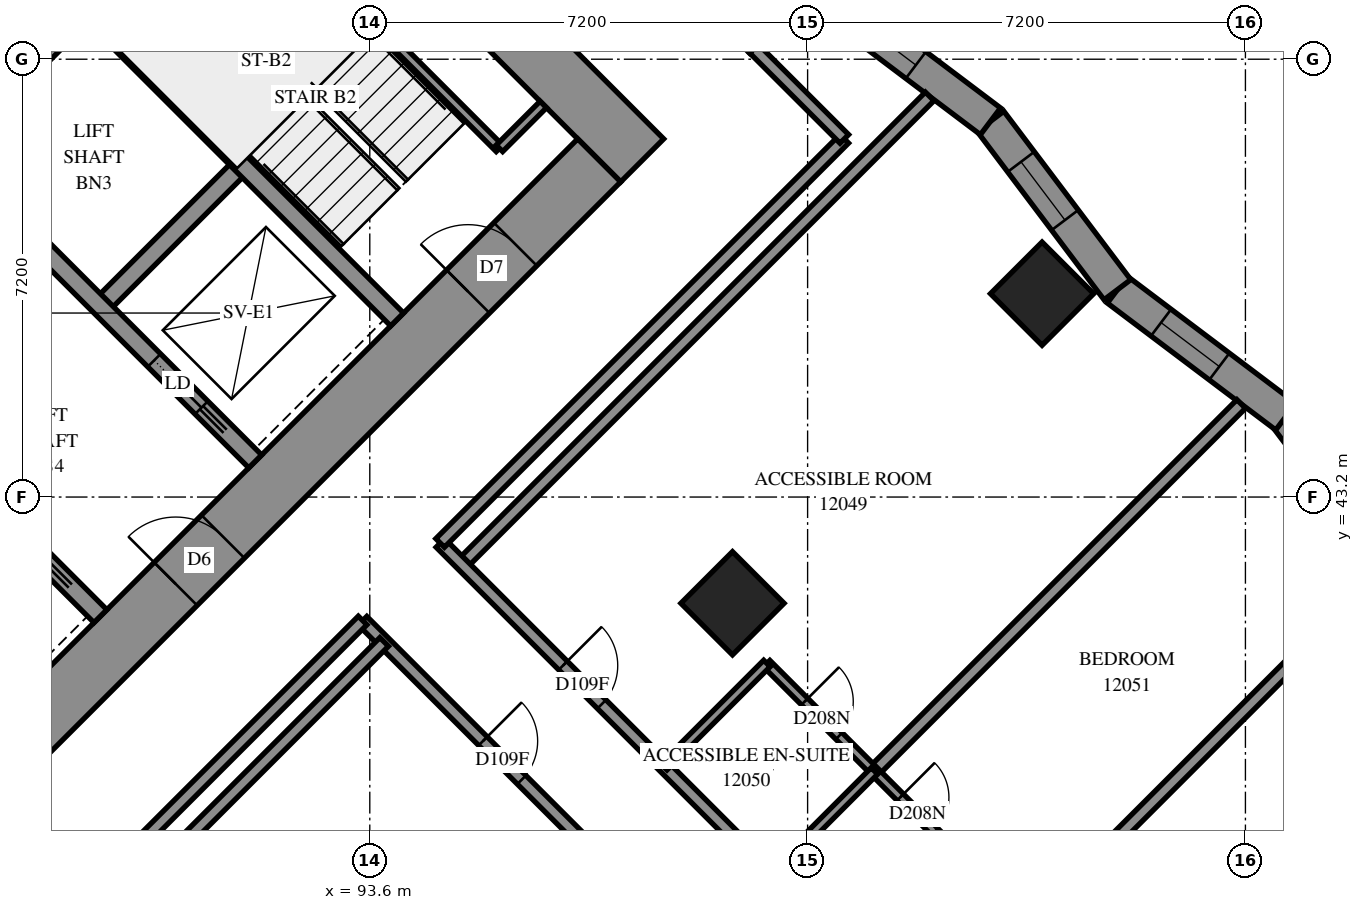
"""IFC4 building model, lengths in metres.
Left out: names, types, materials, properties, quantities, classifications, styles, units other than length and angle.
Written with IfcOpenShell. Run it as: python <this file> out.ifc"""

import sys

from ifc_helpers import new_model, si_unit, direction, frame, frame_2d, origin, origin_2d, place, context, subcontext, project, spatial, polyline, rectangle, outline, extrude, element, fill, save


model = new_model("IFC4")
c1 = context("Model", 3, precision=1e-05, world=origin(), true_north=direction((0.0, 1.0)))
c2 = subcontext(c1, "Body", "Model", "MODEL_VIEW")
j1 = project(units=[si_unit("LENGTHUNIT", "METRE"), si_unit("PLANEANGLEUNIT", "RADIAN")], contexts=[c1])
p1 = place(None, origin())
s1 = spatial("IfcSite", under=j1, at=p1, CompositionType="ELEMENT")
p2 = place(p1, origin())
s2 = spatial("IfcBuilding", under=s1, at=p2, CompositionType="ELEMENT")
p3 = place(p2, frame((0.0, 0.0, 47.4)))
s3 = spatial("IfcBuildingStorey", under=s2, at=p3, CompositionType="ELEMENT", Elevation=47.4)
for number, where, z_axis, x_axis in (
    (1, (104.656, 46.544, 0.0), (0.0, 0.0, 1.0), (0.707, -0.707, 0.0)),
    (2, (99.565, 41.453, 0.0), (0.0, 0.0, 1.0), (0.707, -0.707, 0.0)),
):
    element("IfcColumn", number, at=place(p3, frame(where, z_axis=z_axis, x_axis=x_axis)), inside=s3, PredefinedType="COLUMN", context=c2, shape_type="SweptSolid", body=[
        extrude(rectangle(XDim=1.2, YDim=1.2, at=origin_2d()), origin(), (0.0, 0.0, 1.0), 3.1),
    ])
p4 = place(p3, frame((86.483, 60.333, -0.3), z_axis=(0.0, 0.0, 1.0), x_axis=(0.70710983, -0.7071037324, 0.0)))
e3 = element("IfcWall", 3, at=p4, inside=s3, PredefinedType="SHEAR", context=c2, shape_type="SweptSolid", body=[
    extrude(rectangle(XDim=16.4, YDim=1.0, at=frame_2d((8.2, 0.0))), origin(), (0.0, 0.0, 1.0), 2.7),
])
p5 = place(p4, frame((11.0, 0.0, 0.3)))
e4 = element("IfcOpeningElement", 4, at=p5, cuts=e3, PredefinedType="OPENING", context=c2, shape_type="SweptSolid", body=[
    extrude(rectangle(XDim=0.8, YDim=2.1, at=frame_2d((0.4, 1.05))), frame((0.0, 0.51, 0.0), z_axis=(0.0, -1.0, 0.0), x_axis=(1.0, 0.0, 0.0)), (0.0, 0.0, 1.0), 1.02),
])
p6 = place(p3, frame((87.19, 38.554, -0.3), z_axis=(0.0, 0.0, 1.0), x_axis=(0.707103309, 0.7071102534, 0.0)))
e5 = element("IfcWall", 5, at=p6, inside=s3, PredefinedType="SHEAR", context=c2, shape_type="SweptSolid", body=[
    extrude(rectangle(XDim=14.4, YDim=1.0, at=frame_2d((7.2, 0.0))), origin(), (0.0, 0.0, 1.0), 2.7),
])
p7 = place(p6, frame((4.55, 0.0, 0.3)))
e6 = element("IfcOpeningElement", 6, at=p7, cuts=e5, PredefinedType="OPENING", context=c2, shape_type="SweptSolid", body=[
    extrude(rectangle(XDim=1.1, YDim=2.1, at=frame_2d((0.55, 1.05))), frame((0.0, 0.51, 0.0), z_axis=(0.0, -1.0, 0.0), x_axis=(1.0, 0.0, 0.0)), (0.0, 0.0, 1.0), 1.02),
])
p8 = place(p6, frame((11.35, 0.0, 0.3)))
e7 = element("IfcOpeningElement", 7, at=p8, cuts=e5, PredefinedType="OPENING", context=c2, shape_type="SweptSolid", body=[
    extrude(rectangle(XDim=1.1, YDim=2.1, at=frame_2d((0.55, 1.05))), frame((0.0, 0.51, 0.0), z_axis=(0.0, -1.0, 0.0), x_axis=(1.0, 0.0, 0.0)), (0.0, 0.0, 1.0), 1.02),
])
for number, where, z_axis, x_axis in (
    (8, (86.625, 48.878, 0.0), (0.0, 0.0, 1.0), (0.707, 0.707, 0.0)),
    (9, (89.17, 46.332, 0.0), (0.0, 0.0, 1.0), (0.707, 0.707, 0.0)),
):
    element("IfcWall", number, at=place(p3, frame(where, z_axis=z_axis, x_axis=x_axis)), inside=s3, PredefinedType="SOLIDWALL", context=c2, shape_type="SweptSolid", body=[
        extrude(rectangle(XDim=3.3, YDim=0.3, at=frame_2d((1.65, 0.0))), origin(), (0.0, 0.0, 1.0), 3.1),
    ])
p9 = place(p3, frame((78.988, 51.423, 0.0), z_axis=(0.0, 0.0, 1.0), x_axis=(0.7071067812, -0.7071067812, 0.0)))
e10 = element("IfcWall", 10, at=p9, inside=s3, PredefinedType="SOLIDWALL", context=c2, shape_type="SweptSolid", body=[
    extrude(rectangle(XDim=14.4, YDim=0.3, at=frame_2d((7.2, 0.0))), origin(), (0.0, 0.0, 1.0), 3.1),
])
p10 = place(p9, frame((1.25, 0.0, 0.0)))
e11 = element("IfcOpeningElement", 11, at=p10, cuts=e10, PredefinedType="OPENING", context=c2, shape_type="SweptSolid", body=[
    extrude(rectangle(XDim=1.1, YDim=2.1, at=frame_2d((0.55, 1.05))), frame((0.0, 0.16, 0.0), z_axis=(0.0, -1.0, 0.0), x_axis=(1.0, 0.0, 0.0)), (0.0, 0.0, 1.0), 0.32),
])
p11 = place(p9, frame((4.85, 0.0, 0.0)))
e12 = element("IfcOpeningElement", 12, at=p11, cuts=e10, PredefinedType="OPENING", context=c2, shape_type="SweptSolid", body=[
    extrude(rectangle(XDim=1.1, YDim=2.1, at=frame_2d((0.55, 1.05))), frame((0.0, 0.16, 0.0), z_axis=(0.0, -1.0, 0.0), x_axis=(1.0, 0.0, 0.0)), (0.0, 0.0, 1.0), 0.32),
])
p12 = place(p9, frame((8.45, 0.0, 0.0)))
e13 = element("IfcOpeningElement", 13, at=p12, cuts=e10, PredefinedType="OPENING", context=c2, shape_type="SweptSolid", body=[
    extrude(rectangle(XDim=1.1, YDim=2.1, at=frame_2d((0.55, 1.05))), frame((0.0, 0.16, 0.0), z_axis=(0.0, -1.0, 0.0), x_axis=(1.0, 0.0, 0.0)), (0.0, 0.0, 1.0), 0.32),
])
p13 = place(p9, frame((12.05, 0.0, 0.0)))
e14 = element("IfcOpeningElement", 14, at=p13, cuts=e10, PredefinedType="OPENING", context=c2, shape_type="SweptSolid", body=[
    extrude(rectangle(XDim=1.1, YDim=2.1, at=frame_2d((0.55, 1.05))), frame((0.0, 0.16, 0.0), z_axis=(0.0, -1.0, 0.0), x_axis=(1.0, 0.0, 0.0)), (0.0, 0.0, 1.0), 0.32),
])
p14 = place(p3, frame((81.534, 53.969, 0.0), z_axis=(0.0, 0.0, 1.0), x_axis=(0.707103309, -0.7071102534, 0.0)))
e15 = element("IfcWall", 15, at=p14, inside=s3, PredefinedType="SOLIDWALL", context=c2, shape_type="SweptSolid", body=[
    extrude(rectangle(XDim=14.4, YDim=0.3, at=frame_2d((7.2, 0.0))), origin(), (0.0, 0.0, 1.0), 3.1),
])
p15 = place(p14, frame((12.05, 0.0, 0.0)))
e16 = element("IfcOpeningElement", 16, at=p15, cuts=e15, PredefinedType="OPENING", context=c2, shape_type="SweptSolid", body=[
    extrude(rectangle(XDim=1.1, YDim=2.1, at=frame_2d((0.55, 1.05))), frame((0.0, 0.16, 0.0), z_axis=(0.0, -1.0, 0.0), x_axis=(1.0, 0.0, 0.0)), (0.0, 0.0, 1.0), 0.32),
])
p16 = place(p3, frame((88.958, 51.211, 0.0), z_axis=(0.0, 0.0, 1.0), x_axis=(0.7070998367, -0.7071137256, 0.0)))
e17 = element("IfcWall", 17, at=p16, inside=s3, PredefinedType="SOLIDWALL", context=c2, shape_type="SweptSolid", body=[
    extrude(rectangle(XDim=7.2, YDim=0.3, at=frame_2d((3.6, 0.0))), origin(), (0.0, 0.0, 1.0), 3.1),
])
p17 = place(p3, frame((110.751, 41.753, 0.0), z_axis=(0.0, 0.0, 1.0), x_axis=(-0.6019683111, 0.7985199762, 0.0)))
e18 = element("IfcWall", 18, at=p17, inside=s3, PredefinedType="SOLIDWALL", context=c2, shape_type="SweptSolid", body=[
    extrude(outline(polyline([(0.039, -0.275), (3.506, -0.275), (3.429, 0.275), (-0.039, 0.275), (0.039, -0.275)])), origin(), (0.0, 0.0, 1.0), 3.1),
])
p18 = place(p17, frame((1.266, 0.0, 0.5)))
e19 = element("IfcOpeningElement", 19, at=p18, cuts=e18, PredefinedType="OPENING", context=c2, shape_type="SweptSolid", body=[
    extrude(rectangle(XDim=1.2, YDim=2.45, at=frame_2d((0.6, 1.225))), frame((0.0, 0.285, 0.0), z_axis=(0.0, -1.0, 0.0), x_axis=(1.0, 0.0, 0.0)), (0.0, 0.0, 1.0), 0.57),
])
p19 = place(p3, frame((108.664, 44.522, 0.0), z_axis=(0.0, 0.0, 1.0), x_axis=(-0.7985338376, 0.6019499233, 0.0)))
e20 = element("IfcWall", 20, at=p19, inside=s3, PredefinedType="SOLIDWALL", context=c2, shape_type="SweptSolid", body=[
    extrude(outline(polyline([(-0.039, -0.275), (3.429, -0.275), (3.506, 0.275), (0.039, 0.275), (-0.039, -0.275)])), origin(), (0.0, 0.0, 1.0), 3.1),
])
p20 = place(p19, frame((1.369, 0.0, 0.5)))
e21 = element("IfcOpeningElement", 21, at=p20, cuts=e20, PredefinedType="OPENING", context=c2, shape_type="SweptSolid", body=[
    extrude(rectangle(XDim=1.2, YDim=2.45, at=frame_2d((0.6, 1.225))), frame((0.0, 0.285, 0.0), z_axis=(0.0, -1.0, 0.0), x_axis=(1.0, 0.0, 0.0)), (0.0, 0.0, 1.0), 0.57),
])
p21 = place(p3, frame((105.895, 46.61, 0.0), z_axis=(0.0, 0.0, 1.0), x_axis=(-0.6019499233, 0.7985338376, 0.0)))
e22 = element("IfcWall", 22, at=p21, inside=s3, PredefinedType="SOLIDWALL", context=c2, shape_type="SweptSolid", body=[
    extrude(outline(polyline([(0.039, -0.275), (3.506, -0.275), (3.429, 0.275), (-0.039, 0.275), (0.039, -0.275)])), origin(), (0.0, 0.0, 1.0), 3.1),
])
p22 = place(p21, frame((1.433, 0.0, 0.5)))
e23 = element("IfcOpeningElement", 23, at=p22, cuts=e22, PredefinedType="OPENING", context=c2, shape_type="SweptSolid", body=[
    extrude(rectangle(XDim=1.2, YDim=2.45, at=frame_2d((0.6, 1.225))), frame((0.0, 0.285, 0.0), z_axis=(0.0, -1.0, 0.0), x_axis=(1.0, 0.0, 0.0)), (0.0, 0.0, 1.0), 0.57),
])
p23 = place(p3, frame((103.807, 49.379, 0.0), z_axis=(0.0, 0.0, 1.0), x_axis=(-0.7985338376, 0.6019499233, 0.0)))
e24 = element("IfcWall", 24, at=p23, inside=s3, PredefinedType="SOLIDWALL", context=c2, shape_type="SweptSolid", body=[
    extrude(outline(polyline([(-0.039, -0.275), (3.429, -0.275), (3.506, 0.275), (0.039, 0.275), (-0.039, -0.275)])), origin(), (0.0, 0.0, 1.0), 3.1),
])
p24 = place(p23, frame((1.536, 0.0, 0.5)))
e25 = element("IfcOpeningElement", 25, at=p24, cuts=e24, PredefinedType="OPENING", context=c2, shape_type="SweptSolid", body=[
    extrude(rectangle(XDim=1.2, YDim=2.45, at=frame_2d((0.6, 1.225))), frame((0.0, 0.285, 0.0), z_axis=(0.0, -1.0, 0.0), x_axis=(1.0, 0.0, 0.0)), (0.0, 0.0, 1.0), 0.57),
])
p25 = place(p3, frame((91.313, 53.354, 0.0), z_axis=(0.0, 0.0, 1.0), x_axis=(0.7071147811, -0.7070987812, 0.0)))
e26 = element("IfcWall", 26, at=p25, inside=s3, PredefinedType="PARTITIONING", context=c2, shape_type="SweptSolid", body=[
    extrude(rectangle(XDim=6.25, YDim=0.15, at=frame_2d((3.125, 0.0))), origin(), (0.0, 0.0, 1.0), 3.1),
])
p26 = place(p3, frame((95.732, 48.934, 0.0), z_axis=(0.0, 0.0, 1.0), x_axis=(0.7071067812, 0.7071067812, 0.0)))
e27 = element("IfcWall", 27, at=p26, inside=s3, PredefinedType="PARTITIONING", context=c2, shape_type="SweptSolid", body=[
    extrude(rectangle(XDim=1.02, YDim=0.15, at=frame_2d((0.51, 0.0))), origin(), (0.0, 0.0, 1.0), 3.1),
])
p27 = place(p3, frame((93.481, 41.167, 0.0), z_axis=(0.0, 0.0, 1.0), x_axis=(0.7071067812, -0.7071067812, 0.0)))
e28 = element("IfcWall", 28, at=p27, inside=s3, PredefinedType="PARTITIONING", context=c2, shape_type="SweptSolid", body=[
    extrude(rectangle(XDim=25.699, YDim=0.2, at=frame_2d((12.85, 0.0))), origin(), (0.0, 0.0, 1.0), 3.1),
])
p28 = place(p27, frame((2.8, 0.0, 0.0)))
e29 = element("IfcOpeningElement", 29, at=p28, cuts=e28, PredefinedType="OPENING", context=c2, shape_type="SweptSolid", body=[
    extrude(rectangle(XDim=0.9, YDim=2.1, at=frame_2d((0.45, 1.05))), frame((0.0, 0.11, 0.0), z_axis=(0.0, -1.0, 0.0), x_axis=(1.0, 0.0, 0.0)), (0.0, 0.0, 1.0), 0.22),
])
p29 = place(p27, frame((9.948, 0.0, 0.0)))
e30 = element("IfcOpeningElement", 30, at=p29, cuts=e28, PredefinedType="OPENING", context=c2, shape_type="SweptSolid", body=[
    extrude(rectangle(XDim=0.9, YDim=2.1, at=frame_2d((0.45, 1.05))), frame((0.0, 0.11, 0.0), z_axis=(0.0, -1.0, 0.0), x_axis=(1.0, 0.0, 0.0)), (0.0, 0.0, 1.0), 0.22),
])
p30 = place(p27, frame((11.7, 0.0, 0.0)))
e31 = element("IfcOpeningElement", 31, at=p30, cuts=e28, PredefinedType="OPENING", context=c2, shape_type="SweptSolid", body=[
    extrude(rectangle(XDim=0.9, YDim=2.1, at=frame_2d((0.45, 1.05))), frame((0.0, 0.11, 0.0), z_axis=(0.0, -1.0, 0.0), x_axis=(1.0, 0.0, 0.0)), (0.0, 0.0, 1.0), 0.22),
])
p31 = place(p27, frame((17.25, 0.0, 0.0)))
e32 = element("IfcOpeningElement", 32, at=p31, cuts=e28, PredefinedType="OPENING", context=c2, shape_type="SweptSolid", body=[
    extrude(rectangle(XDim=0.9, YDim=2.1, at=frame_2d((0.45, 1.05))), frame((0.0, 0.11, 0.0), z_axis=(0.0, -1.0, 0.0), x_axis=(1.0, 0.0, 0.0)), (0.0, 0.0, 1.0), 0.22),
])
p32 = place(p27, frame((22.82, 0.0, 0.0)))
e33 = element("IfcOpeningElement", 33, at=p32, cuts=e28, PredefinedType="OPENING", context=c2, shape_type="SweptSolid", body=[
    extrude(rectangle(XDim=0.9, YDim=2.1, at=frame_2d((0.45, 1.05))), frame((0.0, 0.11, 0.0), z_axis=(0.0, -1.0, 0.0), x_axis=(1.0, 0.0, 0.0)), (0.0, 0.0, 1.0), 0.22),
])
p33 = place(p3, frame((105.292, 31.908, 0.0), z_axis=(0.0, 0.0, 1.0), x_axis=(0.7071067812, 0.7071067812, 0.0)))
e34 = element("IfcWall", 34, at=p33, inside=s3, PredefinedType="PARTITIONING", context=c2, shape_type="SweptSolid", body=[
    extrude(rectangle(XDim=10.979, YDim=0.2, at=frame_2d((5.49, 0.0))), origin(), (0.0, 0.0, 1.0), 3.1),
])
p34 = place(p3, frame((95.109, 42.091, 0.0), z_axis=(0.0, 0.0, 1.0), x_axis=(0.7071113741, 0.7071021882, 0.0)))
e35 = element("IfcWall", 35, at=p34, inside=s3, PredefinedType="PARTITIONING", context=c2, shape_type="SweptSolid", body=[
    extrude(rectangle(XDim=10.886, YDim=0.2, at=frame_2d((5.443, 0.0))), origin(), (0.0, 0.0, 1.0), 3.1),
])
p35 = place(p3, frame((86.317, 33.298, 0.0), z_axis=(0.0, 0.0, 1.0), x_axis=(0.7071020793, 0.7071114831, 0.0)))
e36 = element("IfcWall", 36, at=p35, inside=s3, PredefinedType="PARTITIONING", context=c2, shape_type="SweptSolid", body=[
    extrude(rectangle(XDim=10.634, YDim=0.2, at=frame_2d((5.317, 0.0))), origin(), (0.0, 0.0, 1.0), 3.1),
])
p36 = place(p3, frame((94.761, 42.446, 0.0), z_axis=(0.0, 0.0, 1.0), x_axis=(0.7071067812, -0.7071067812, 0.0)))
e37 = element("IfcWall", 37, at=p36, inside=s3, PredefinedType="PARTITIONING", context=c2, shape_type="SweptSolid", body=[
    extrude(rectangle(XDim=9.597, YDim=0.2, at=frame_2d((4.798, 0.0))), origin(), (0.0, 0.0, 1.0), 3.1),
])
p37 = place(p36, frame((2.851, 0.0, 0.0)))
e38 = element("IfcOpeningElement", 38, at=p37, cuts=e37, PredefinedType="OPENING", context=c2, shape_type="SweptSolid", body=[
    extrude(rectangle(XDim=0.9, YDim=2.1, at=frame_2d((0.45, 1.05))), frame((0.0, 0.11, 0.0), z_axis=(0.0, -1.0, 0.0), x_axis=(1.0, 0.0, 0.0)), (0.0, 0.0, 1.0), 0.22),
])
for number, where, z_axis, x_axis in (
    (39, (86.836, 34.524, 0.0), (0.0, 0.0, 1.0), (0.707, 0.707, 0.0)),
    (40, (94.757, 42.445, 0.0), (0.0, 0.0, 1.0), (0.707, 0.707, 0.0)),
):
    element("IfcWall", number, at=place(p3, frame(where, z_axis=z_axis, x_axis=x_axis)), inside=s3, PredefinedType="PARTITIONING", context=c2, shape_type="SweptSolid", body=[
        extrude(rectangle(XDim=9.399, YDim=0.2, at=frame_2d((4.699, 0.0))), origin(), (0.0, 0.0, 1.0), 3.1),
    ])
p38 = place(p3, frame((101.896, 38.698, 0.0), z_axis=(0.0, 0.0, 1.0), x_axis=(0.7072298261, 0.7069837149, 0.0)))
e41 = element("IfcWall", 41, at=p38, inside=s3, PredefinedType="PARTITIONING", context=c2, shape_type="SweptSolid", body=[
    extrude(rectangle(XDim=8.533, YDim=0.2, at=frame_2d((4.266, 0.0))), origin(), (0.0, 0.0, 1.0), 3.1),
])
p39 = place(p3, frame((105.255, 36.963, 0.0), z_axis=(0.0, 0.0, 1.0), x_axis=(0.7071067812, 0.7071067812, 0.0)))
e42 = element("IfcWall", 42, at=p39, inside=s3, PredefinedType="PARTITIONING", context=c2, shape_type="SweptSolid", body=[
    extrude(rectangle(XDim=5.504, YDim=0.2, at=frame_2d((2.752, 0.0))), origin(), (0.0, 0.0, 1.0), 3.1),
])
p40 = place(p3, frame((100.126, 40.461, 0.0), z_axis=(0.0, 0.0, 1.0), x_axis=(0.7071067812, -0.7071067812, 0.0)))
e43 = element("IfcWall", 43, at=p40, inside=s3, PredefinedType="PARTITIONING", context=c2, shape_type="SweptSolid", body=[
    extrude(rectangle(XDim=4.401, YDim=0.15, at=frame_2d((2.2, 0.0))), origin(), (0.0, 0.0, 1.0), 3.1),
])
p41 = place(p40, frame((0.883, 0.0, 0.0)))
e44 = element("IfcOpeningElement", 44, at=p41, cuts=e43, PredefinedType="OPENING", context=c2, shape_type="SweptSolid", body=[
    extrude(rectangle(XDim=0.8, YDim=2.1, at=frame_2d((0.4, 1.05))), frame((0.0, 0.085, 0.0), z_axis=(0.0, -1.0, 0.0), x_axis=(1.0, 0.0, 0.0)), (0.0, 0.0, 1.0), 0.17),
])
p42 = place(p40, frame((3.108, 0.0, 0.0)))
e45 = element("IfcOpeningElement", 45, at=p42, cuts=e43, PredefinedType="OPENING", context=c2, shape_type="SweptSolid", body=[
    extrude(rectangle(XDim=0.8, YDim=2.1, at=frame_2d((0.4, 1.05))), frame((0.0, 0.085, 0.0), z_axis=(0.0, -1.0, 0.0), x_axis=(1.0, 0.0, 0.0)), (0.0, 0.0, 1.0), 0.17),
])
for number, where, z_axis, x_axis in (
    (46, (98.435, 38.765, 0.0), (0.0, 0.0, 1.0), (0.707, 0.708, 0.0)),
    (47, (100.203, 36.997, 0.0), (0.0, 0.0, 1.0), (0.707, 0.708, 0.0)),
):
    element("IfcWall", number, at=place(p3, frame(where, z_axis=z_axis, x_axis=x_axis)), inside=s3, PredefinedType="PARTITIONING", context=c2, shape_type="SweptSolid", body=[
        extrude(rectangle(XDim=2.4, YDim=0.15, at=frame_2d((1.2, 0.0))), origin(), (0.0, 0.0, 1.0), 3.1),
    ])
p43 = place(p3, frame((99.918, 50.574, 0.0), z_axis=(0.0, 0.0, 1.0), x_axis=(0.7075827869, -0.7066304548, 0.0)))
e48 = element("IfcWall", 48, at=p43, inside=s3, PredefinedType="PARTITIONING", context=c2, shape_type="SweptSolid", body=[
    extrude(rectangle(XDim=2.1, YDim=0.2, at=frame_2d((1.05, 0.0))), origin(), (0.0, 0.0, 1.0), 3.1),
])
p44 = place(p3, frame((99.453, 51.033, 0.0), z_axis=(0.0, 0.0, 1.0), x_axis=(0.7071067812, -0.7071067812, 0.0)))
e49 = element("IfcWall", 49, at=p44, inside=s3, PredefinedType="PARTITIONING", context=c2, shape_type="SweptSolid", body=[
    extrude(rectangle(XDim=0.653, YDim=0.2, at=frame_2d((0.327, 0.0))), origin(), (0.0, 0.0, 1.0), 3.1),
])
p45 = place(p20, origin())
e50 = element("IfcWindow", 50, at=p45, inside=s3, PartitioningType="SINGLE_PANEL", PredefinedType="WINDOW", context=c2, shape_type="SweptSolid", body=[
    extrude(rectangle(XDim=1.2, YDim=2.45, at=frame_2d((0.6, 1.225))), frame((0.0, 0.155, 0.0), z_axis=(0.0, -1.0, 0.0), x_axis=(1.0, 0.0, 0.0)), (0.0, 0.0, 1.0), 0.06),
])
fill(e21, e50)
p46 = place(p22, origin())
e51 = element("IfcWindow", 51, at=p46, inside=s3, PartitioningType="SINGLE_PANEL", PredefinedType="WINDOW", context=c2, shape_type="SweptSolid", body=[
    extrude(rectangle(XDim=1.2, YDim=2.45, at=frame_2d((0.6, 1.225))), frame((0.0, 0.155, 0.0), z_axis=(0.0, -1.0, 0.0), x_axis=(1.0, 0.0, 0.0)), (0.0, 0.0, 1.0), 0.06),
])
fill(e23, e51)
p47 = place(p24, origin())
e52 = element("IfcWindow", 52, at=p47, inside=s3, PartitioningType="SINGLE_PANEL", PredefinedType="WINDOW", context=c2, shape_type="SweptSolid", body=[
    extrude(rectangle(XDim=1.2, YDim=2.45, at=frame_2d((0.6, 1.225))), frame((0.0, 0.155, 0.0), z_axis=(0.0, -1.0, 0.0), x_axis=(1.0, 0.0, 0.0)), (0.0, 0.0, 1.0), 0.06),
])
fill(e25, e52)
p48 = place(p7, origin())
e53 = element("IfcDoor", 53, at=p48, inside=s3, OperationType="DOUBLE_DOOR_SINGLE_SWING", PredefinedType="DOOR", context=c2, shape_type="SweptSolid", body=[
    extrude(rectangle(XDim=1.1, YDim=2.1, at=frame_2d((0.55, 1.05))), frame((0.0, 0.025, 0.0), z_axis=(0.0, -1.0, 0.0), x_axis=(1.0, 0.0, 0.0)), (0.0, 0.0, 1.0), 0.05),
])
fill(e6, e53)
p49 = place(p8, origin())
e54 = element("IfcDoor", 54, at=p49, inside=s3, OperationType="SINGLE_SWING_RIGHT", PredefinedType="DOOR", context=c2, shape_type="SweptSolid", body=[
    extrude(rectangle(XDim=1.1, YDim=2.1, at=frame_2d((0.55, 1.05))), frame((0.0, 0.025, 0.0), z_axis=(0.0, -1.0, 0.0), x_axis=(1.0, 0.0, 0.0)), (0.0, 0.0, 1.0), 0.05),
])
fill(e7, e54)
p50 = place(p15, origin())
e55 = element("IfcDoor", 55, at=p50, inside=s3, OperationType="SLIDING_TO_RIGHT", PredefinedType="DOOR", context=c2, shape_type="SweptSolid", body=[
    extrude(rectangle(XDim=1.1, YDim=2.1, at=frame_2d((0.55, 1.05))), frame((0.0, 0.025, 0.0), z_axis=(0.0, -1.0, 0.0), x_axis=(1.0, 0.0, 0.0)), (0.0, 0.0, 1.0), 0.05),
])
fill(e16, e55)
p51 = place(p37, origin())
e56 = element("IfcDoor", 56, at=p51, inside=s3, OperationType="SINGLE_SWING_RIGHT", PredefinedType="DOOR", context=c2, shape_type="SweptSolid", body=[
    extrude(rectangle(XDim=0.9, YDim=2.1, at=frame_2d((0.45, 1.05))), frame((0.0, 0.025, 0.0), z_axis=(0.0, -1.0, 0.0), x_axis=(1.0, 0.0, 0.0)), (0.0, 0.0, 1.0), 0.05),
])
fill(e38, e56)
p52 = place(p41, origin())
e57 = element("IfcDoor", 57, at=p52, inside=s3, OperationType="SINGLE_SWING_RIGHT", PredefinedType="DOOR", context=c2, shape_type="SweptSolid", body=[
    extrude(rectangle(XDim=0.8, YDim=2.1, at=frame_2d((0.4, 1.05))), frame((0.0, 0.025, 0.0), z_axis=(0.0, -1.0, 0.0), x_axis=(1.0, 0.0, 0.0)), (0.0, 0.0, 1.0), 0.05),
])
fill(e44, e57)
p53 = place(p42, origin())
e58 = element("IfcDoor", 58, at=p53, inside=s3, OperationType="SINGLE_SWING_RIGHT", PredefinedType="DOOR", context=c2, shape_type="SweptSolid", body=[
    extrude(rectangle(XDim=0.8, YDim=2.1, at=frame_2d((0.4, 1.05))), frame((0.0, 0.025, 0.0), z_axis=(0.0, -1.0, 0.0), x_axis=(1.0, 0.0, 0.0)), (0.0, 0.0, 1.0), 0.05),
])
fill(e45, e58)
p54 = place(p28, origin())
e59 = element("IfcDoor", 59, at=p54, inside=s3, OperationType="SINGLE_SWING_LEFT", PredefinedType="DOOR", context=c2, shape_type="SweptSolid", body=[
    extrude(rectangle(XDim=0.9, YDim=2.1, at=frame_2d((0.45, 1.05))), frame((0.0, 0.025, 0.0), z_axis=(0.0, -1.0, 0.0), x_axis=(1.0, 0.0, 0.0)), (0.0, 0.0, 1.0), 0.05),
])
fill(e29, e59)
save(model, sys.argv[1])
